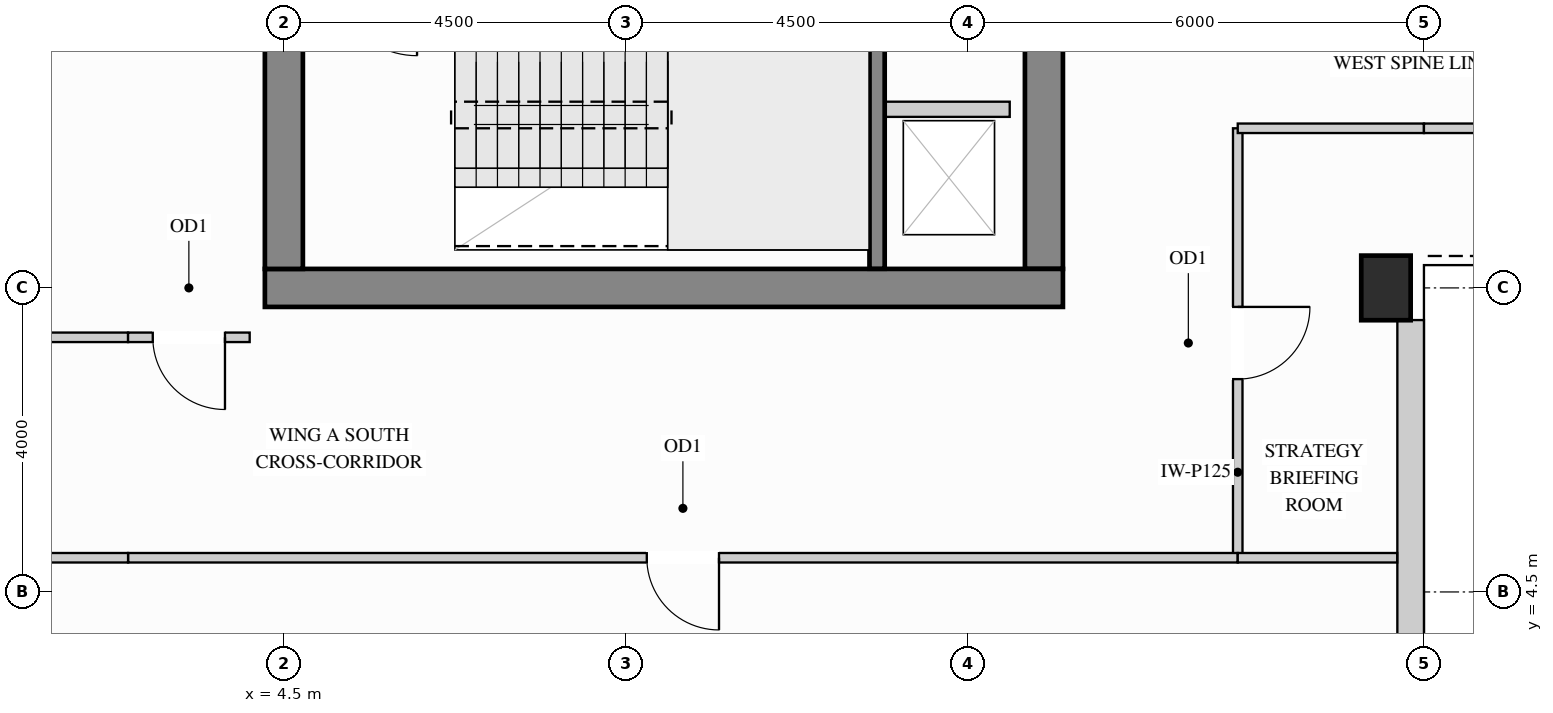
"""IFC4 building model, lengths in metres.
Left out: names, types, materials, properties, quantities, classifications, styles, units other than length and angle.
Written with IfcOpenShell. Run it as: python <this file> out.ifc"""

import sys

from ifc_helpers import new_model, si_unit, direction, frame, frame_2d, origin, origin_2d, place, context, subcontext, project, spatial, rectangle, extrude, source, transform, mapped, element, fill, save


model = new_model("IFC4")
c1 = context("Model", 3, precision=1e-05, world=origin(), true_north=direction((0.0, 1.0)))
c2 = subcontext(c1, "Body", "Model", "MODEL_VIEW")
j1 = project(units=[si_unit("LENGTHUNIT", "METRE"), si_unit("PLANEANGLEUNIT", "RADIAN")], contexts=[c1])
p1 = place(None, origin())
s1 = spatial("IfcSite", under=j1, at=p1, CompositionType="ELEMENT")
p2 = place(p1, origin())
s2 = spatial("IfcBuilding", under=s1, at=p2, CompositionType="ELEMENT")
p3 = place(p2, frame((0.0, 0.0, 244.8)))
s3 = spatial("IfcBuildingStorey", under=s2, at=p3, CompositionType="ELEMENT", Elevation=244.8)
m1 = source(origin(), c2, "Body", "SweptSolid", [
    extrude(rectangle(XDim=0.65, YDim=0.85, at=origin_2d()), origin(), (0.0, 0.0, 1.0), 3.4),
])
p4 = place(p3, frame((19.0, 8.5, 0.0), z_axis=(0.0, 0.0, 1.0), x_axis=(1.0, 0.0, 0.0)))
e1 = element("IfcColumn", 1, at=p4, inside=s3, PredefinedType="COLUMN", context=c2, shape_type="MappedRepresentation", body=[
    mapped(m1, transform((0.0, 0.0, 0.0), x_axis=(1.0, 0.0, 0.0), y_axis=(0.0, 1.0, 0.0), z_axis=(0.0, 0.0, 1.0))),
])
m2 = source(origin(), c2, "Body", "SweptSolid", [
    extrude(rectangle(XDim=10.07, YDim=0.5, at=frame_2d((5.035, 0.0))), origin(), (0.0, 0.0, 1.0), 3.4),
])
p5 = place(p3, frame((14.5, 8.75, 0.0), z_axis=(0.0, 0.0, 1.0), x_axis=(0.0, 1.0, 0.0)))
e2 = element("IfcWall", 2, at=p5, inside=s3, PredefinedType="SHEAR", context=c2, shape_type="MappedRepresentation", body=[
    mapped(m2, transform((0.0, 0.0, 0.0), x_axis=(1.0, 0.0, 0.0), y_axis=(0.0, 1.0, 0.0), z_axis=(0.0, 0.0, 1.0))),
])
m3 = source(origin(), c2, "Body", "SweptSolid", [
    extrude(rectangle(XDim=10.5, YDim=0.5, at=frame_2d((5.25, 0.0))), origin(), (0.0, 0.0, 1.0), 3.4),
])
p6 = place(p3, frame((4.25, 8.5, 0.0), z_axis=(0.0, 0.0, 1.0), x_axis=(1.0, 0.0, 0.0)))
e3 = element("IfcWall", 3, at=p6, inside=s3, PredefinedType="SHEAR", context=c2, shape_type="MappedRepresentation", body=[
    mapped(m3, transform((0.0, 0.0, 0.0), x_axis=(1.0, 0.0, 0.0), y_axis=(0.0, 1.0, 0.0), z_axis=(0.0, 0.0, 1.0))),
])
m4 = source(origin(), c2, "Body", "SweptSolid", [
    extrude(rectangle(XDim=20.5, YDim=0.5, at=frame_2d((10.25, 0.0))), origin(), (0.0, 0.0, 1.0), 3.4),
])
p7 = place(p3, frame((4.5, 8.75, 0.0), z_axis=(0.0, 0.0, 1.0), x_axis=(0.0, 1.0, 0.0)))
e4 = element("IfcWall", 4, at=p7, inside=s3, PredefinedType="SHEAR", context=c2, shape_type="MappedRepresentation", body=[
    mapped(m4, transform((0.0, 0.0, 0.0), x_axis=(1.0, 0.0, 0.0), y_axis=(0.0, 1.0, 0.0), z_axis=(0.0, 0.0, 1.0))),
])
m5 = source(origin(), c2, "Body", "SweptSolid", [
    extrude(rectangle(XDim=4.154, YDim=0.35, at=frame_2d((2.077, 0.0))), origin(), (0.0, 0.0, 1.0), 2.619),
])
p8 = place(p3, frame((19.325, 3.923, 0.0), z_axis=(0.0, 0.0, 1.0), x_axis=(0.0, 1.0, 0.0)))
e5 = element("IfcWall", 5, at=p8, inside=s3, PredefinedType="SOLIDWALL", context=c2, shape_type="MappedRepresentation", body=[
    mapped(m5, transform((0.0, 0.0, 0.0), x_axis=(1.0, 0.0, 0.0), y_axis=(0.0, 1.0, 0.0), z_axis=(0.0, 0.0, 1.0))),
])
p9 = place(p3, frame((17.05, 4.95, 0.0), z_axis=(0.0, 0.0, 1.0), x_axis=(0.0, 1.0, 0.0)))
e6 = element("IfcWall", 6, at=p9, inside=s3, PredefinedType="PARTITIONING", context=c2, shape_type="SweptSolid", body=[
    extrude(rectangle(XDim=5.65, YDim=0.125, at=frame_2d((2.825, 0.0))), origin(), (0.0, 0.0, 1.0), 3.385),
])
p10 = place(p9, frame((2.35, 0.0, 0.0)))
e7 = element("IfcOpeningElement", 7, at=p10, cuts=e6, PredefinedType="OPENING", context=c2, shape_type="SweptSolid", body=[
    extrude(rectangle(XDim=0.95, YDim=2.15, at=frame_2d((0.475, 1.075))), frame((0.0, 0.073, 0.0), z_axis=(0.0, -1.0, 0.0), x_axis=(1.0, 0.0, 0.0)), (0.0, 0.0, 1.0), 0.145),
])
m6 = source(origin(), c2, "Body", "SweptSolid", [
    extrude(rectangle(XDim=2.098, YDim=0.125, at=frame_2d((1.049, 0.0))), origin(), (0.0, 0.0, 1.0), 3.385),
])
p11 = place(p3, frame((0.352, 7.85, 0.0), z_axis=(0.0, 0.0, 1.0), x_axis=(1.0, 0.0, 0.0)))
e8 = element("IfcWall", 8, at=p11, inside=s3, PredefinedType="PARTITIONING", context=c2, shape_type="MappedRepresentation", body=[
    mapped(m6, transform((0.0, 0.0, 0.0), x_axis=(1.0, 0.0, 0.0), y_axis=(0.0, 1.0, 0.0), z_axis=(0.0, 0.0, 1.0))),
])
p12 = place(p3, frame((2.45, 7.85, 0.0), z_axis=(0.0, 0.0, 1.0), x_axis=(1.0, 0.0, 0.0)))
e9 = element("IfcWall", 9, at=p12, inside=s3, PredefinedType="PARTITIONING", context=c2, shape_type="SweptSolid", body=[
    extrude(rectangle(XDim=1.6, YDim=0.125, at=frame_2d((0.8, 0.0))), origin(), (0.0, 0.0, 1.0), 3.385),
])
p13 = place(p12, frame((0.325, 0.0, 0.0)))
e10 = element("IfcOpeningElement", 10, at=p13, cuts=e9, PredefinedType="OPENING", context=c2, shape_type="SweptSolid", body=[
    extrude(rectangle(XDim=0.95, YDim=2.15, at=frame_2d((0.475, 1.075))), frame((0.0, 0.073, 0.0), z_axis=(0.0, -1.0, 0.0), x_axis=(1.0, 0.0, 0.0)), (0.0, 0.0, 1.0), 0.145),
])
m7 = source(origin(), c2, "Body", "SweptSolid", [
    extrude(rectangle(XDim=2.45, YDim=0.125, at=frame_2d((1.225, 0.0))), origin(), (0.0, 0.0, 1.0), 3.385),
])
p14 = place(p3, frame((17.05, 10.6, 0.0), z_axis=(0.0, 0.0, 1.0), x_axis=(1.0, 0.0, 0.0)))
e11 = element("IfcWall", 11, at=p14, inside=s3, PredefinedType="PARTITIONING", context=c2, shape_type="MappedRepresentation", body=[
    mapped(m7, transform((0.0, 0.0, 0.0), x_axis=(1.0, 0.0, 0.0), y_axis=(0.0, 1.0, 0.0), z_axis=(0.0, 0.0, 1.0))),
])
p15 = place(p3, frame((19.5, 10.6, 0.0), z_axis=(0.0, 0.0, 1.0), x_axis=(1.0, 0.0, 0.0)))
e12 = element("IfcWall", 12, at=p15, inside=s3, PredefinedType="PARTITIONING", context=c2, shape_type="SweptSolid", body=[
    extrude(rectangle(XDim=14.9, YDim=0.125, at=frame_2d((7.45, 0.0))), origin(), (0.0, 0.0, 1.0), 3.385),
])
p16 = place(p15, frame((6.975, 0.0, 0.0)))
e13 = element("IfcOpeningElement", 13, at=p16, cuts=e12, PredefinedType="OPENING", context=c2, shape_type="SweptSolid", body=[
    extrude(rectangle(XDim=0.95, YDim=2.15, at=frame_2d((0.475, 1.075))), frame((0.0, 0.073, 0.0), z_axis=(0.0, -1.0, 0.0), x_axis=(1.0, 0.0, 0.0)), (0.0, 0.0, 1.0), 0.145),
])
p17 = place(p3, frame((2.45, 4.95, 0.0), z_axis=(0.0, 0.0, 1.0), x_axis=(1.0, 0.0, 0.0)))
e14 = element("IfcWall", 14, at=p17, inside=s3, PredefinedType="PARTITIONING", context=c2, shape_type="SweptSolid", body=[
    extrude(rectangle(XDim=14.6, YDim=0.125, at=frame_2d((7.3, 0.0))), origin(), (0.0, 0.0, 1.0), 2.848),
])
p18 = place(p17, frame((6.825, 0.0, 0.0)))
e15 = element("IfcOpeningElement", 15, at=p18, cuts=e14, PredefinedType="OPENING", context=c2, shape_type="SweptSolid", body=[
    extrude(rectangle(XDim=0.95, YDim=2.15, at=frame_2d((0.475, 1.075))), frame((0.0, 0.073, 0.0), z_axis=(0.0, -1.0, 0.0), x_axis=(1.0, 0.0, 0.0)), (0.0, 0.0, 1.0), 0.145),
])
m8 = source(origin(), c2, "Body", "SweptSolid", [
    extrude(rectangle(XDim=2.098, YDim=0.125, at=frame_2d((1.049, 0.0))), origin(), (0.0, 0.0, 1.0), 2.848),
])
for number, where, z_axis, x_axis in (
    (16, (0.352, 4.95, 0.0), (0.0, 0.0, 1.0), (1.0, 0.0, 0.0)),
    (17, (17.05, 4.95, 0.0), (0.0, 0.0, 1.0), (1.0, 0.0, 0.0)),
):
    element("IfcWall", number, at=place(p3, frame(where, z_axis=z_axis, x_axis=x_axis)), inside=s3, PredefinedType="PARTITIONING", context=c2, shape_type="MappedRepresentation", body=[
        mapped(m8, transform((0.0, 0.0, 0.0), x_axis=(1.0, 0.0, 0.0), y_axis=(0.0, 1.0, 0.0), z_axis=(0.0, 0.0, 1.0))),
    ])
m9 = source(origin(), c2, "Body", "SweptSolid", [
    extrude(rectangle(XDim=1.63, YDim=0.2, at=frame_2d((0.815, 0.0))), origin(), (0.0, 0.0, 1.0), 3.385),
])
p19 = place(p3, frame((12.42, 10.85, 0.0), z_axis=(0.0, 0.0, 1.0), x_axis=(1.0, 0.0, 0.0)))
e18 = element("IfcWall", 18, at=p19, inside=s3, PredefinedType="PARTITIONING", context=c2, shape_type="MappedRepresentation", body=[
    mapped(m9, transform((0.0, 0.0, 0.0), x_axis=(1.0, 0.0, 0.0), y_axis=(0.0, 1.0, 0.0), z_axis=(0.0, 0.0, 1.0))),
])
m10 = source(origin(), c2, "Body", "SweptSolid", [
    extrude(rectangle(XDim=3.803, YDim=0.2, at=frame_2d((1.901, 0.0))), origin(), (0.0, 0.0, 1.0), 3.4),
])
p20 = place(p3, frame((12.305, 8.752, 0.0), z_axis=(0.0, 0.0, 1.0), x_axis=(0.0, 1.0, 0.0)))
e19 = element("IfcWall", 19, at=p20, inside=s3, PredefinedType="SHEAR", context=c2, shape_type="MappedRepresentation", body=[
    mapped(m10, transform((0.0, 0.0, 0.0), x_axis=(1.0, 0.0, 0.0), y_axis=(0.0, 1.0, 0.0), z_axis=(0.0, 0.0, 1.0))),
])
m11 = source(origin(), c2, "Body", "SweptSolid", [
    extrude(rectangle(XDim=0.95, YDim=2.15, at=frame_2d((0.475, 1.075))), frame((0.0, 0.025, 0.0), z_axis=(0.0, -1.0, 0.0), x_axis=(1.0, 0.0, 0.0)), (0.0, 0.0, 1.0), 0.05),
])
p21 = place(p10, origin())
e20 = element("IfcDoor", 20, at=p21, inside=s3, OperationType="SINGLE_SWING_RIGHT", PredefinedType="DOOR", context=c2, shape_type="MappedRepresentation", body=[
    mapped(m11, transform((0.0, 0.0, 0.0), x_axis=(1.0, 0.0, 0.0), y_axis=(0.0, 1.0, 0.0), z_axis=(0.0, 0.0, 1.0))),
])
fill(e7, e20)
p22 = place(p18, origin())
e21 = element("IfcDoor", 21, at=p22, inside=s3, OperationType="SINGLE_SWING_RIGHT", PredefinedType="DOOR", context=c2, shape_type="MappedRepresentation", body=[
    mapped(m11, transform((0.0, 0.0, 0.0), x_axis=(1.0, 0.0, 0.0), y_axis=(0.0, 1.0, 0.0), z_axis=(0.0, 0.0, 1.0))),
])
fill(e15, e21)
p23 = place(p13, origin())
e22 = element("IfcDoor", 22, at=p23, inside=s3, OperationType="SINGLE_SWING_RIGHT", PredefinedType="DOOR", context=c2, shape_type="MappedRepresentation", body=[
    mapped(m11, transform((0.0, 0.0, 0.0), x_axis=(1.0, 0.0, 0.0), y_axis=(0.0, 1.0, 0.0), z_axis=(0.0, 0.0, 1.0))),
])
fill(e10, e22)
save(model, sys.argv[1])
